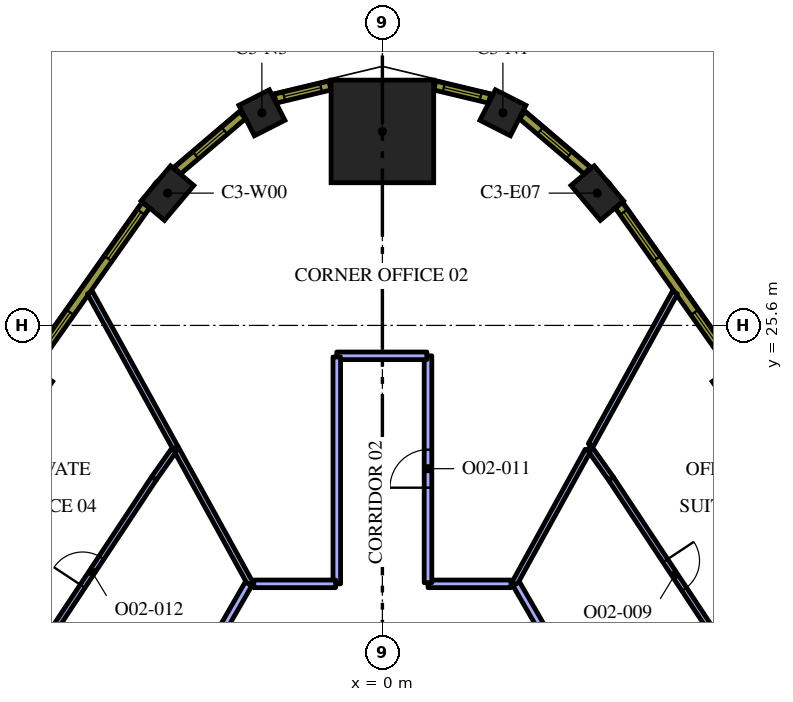
"""IFC4 building model, lengths in metres.
Left out: names, types, materials, properties, quantities, classifications, styles, units other than length and angle.
Written with IfcOpenShell. Run it as: python <this file> out.ifc"""

import sys

from ifc_helpers import new_model, si_unit, direction, frame, frame_2d, origin, origin_2d, place, context, subcontext, project, spatial, rectangle, extrude, element, fill, save


model = new_model("IFC4")
c1 = context("Model", 3, precision=1e-05, world=origin(), true_north=direction((0.0, 1.0)))
c2 = subcontext(c1, "Body", "Model", "MODEL_VIEW")
j1 = project(units=[si_unit("LENGTHUNIT", "METRE"), si_unit("PLANEANGLEUNIT", "RADIAN")], contexts=[c1])
p1 = place(None, origin())
s1 = spatial("IfcSite", under=j1, at=p1, CompositionType="ELEMENT")
p2 = place(p1, origin())
s2 = spatial("IfcBuilding", under=s1, at=p2, CompositionType="ELEMENT")
p3 = place(p2, frame((0.0, 0.0, 158.4)))
s3 = spatial("IfcBuildingStorey", under=s2, at=p3, CompositionType="ELEMENT", Elevation=158.4)
p4 = place(p3, frame((0.0, 30.704, 0.0), z_axis=(0.0, 0.0, 1.0), x_axis=(0.0, 1.0, 0.0)))
e1 = element("IfcColumn", 1, at=p4, inside=s3, PredefinedType="COLUMN", context=c2, shape_type="SweptSolid", body=[
    extrude(rectangle(XDim=2.7, YDim=2.7, at=origin_2d()), origin(), (0.0, 0.0, 1.0), 4.2),
])
for number, where, z_axis, x_axis in (
    (2, (9.348, 23.854, 0.0), (0.0, 0.0, 1.0), (-0.565, 0.825, 0.0)),
    (3, (5.654, 29.081, 0.0), (0.0, 0.0, 1.0), (-0.644, 0.765, 0.0)),
):
    element("IfcColumn", number, at=place(p3, frame(where, z_axis=z_axis, x_axis=x_axis)), inside=s3, PredefinedType="COLUMN", context=c2, shape_type="SweptSolid", body=[
        extrude(rectangle(XDim=1.2, YDim=0.8, at=origin_2d()), origin(), (0.0, 0.0, 1.0), 4.2),
    ])
for number, where, z_axis, x_axis in (
    (4, (3.171, 31.195, 0.0), (0.0, 0.0, 1.0), (-0.891, 0.453, 0.0)),
    (5, (-3.171, 31.195, 0.0), (0.0, 0.0, 1.0), (-0.891, -0.453, 0.0)),
):
    element("IfcColumn", number, at=place(p3, frame(where, z_axis=z_axis, x_axis=x_axis)), inside=s3, PredefinedType="COLUMN", context=c2, shape_type="SweptSolid", body=[
        extrude(rectangle(XDim=0.9, YDim=0.9, at=origin_2d()), origin(), (0.0, 0.0, 1.0), 4.2),
    ])
for number, where, z_axis, x_axis in (
    (6, (-5.654, 29.081, 0.0), (0.0, 0.0, 1.0), (-0.644, -0.765, 0.0)),
    (7, (-9.348, 23.854, 0.0), (0.0, 0.0, 1.0), (-0.565, -0.825, 0.0)),
):
    element("IfcColumn", number, at=place(p3, frame(where, z_axis=z_axis, x_axis=x_axis)), inside=s3, PredefinedType="COLUMN", context=c2, shape_type="SweptSolid", body=[
        extrude(rectangle(XDim=1.2, YDim=0.8, at=origin_2d()), origin(), (0.0, 0.0, 1.0), 4.2),
    ])
p5 = place(p3, frame((6.013, 21.573, 0.0), z_axis=(0.0, 0.0, 1.0), x_axis=(0.551906048292, -0.833906298009, 0.0)))
e8 = element("IfcWall", 8, at=p5, inside=s3, PredefinedType="PARTITIONING", context=c2, shape_type="SweptSolid", body=[
    extrude(rectangle(XDim=5.995, YDim=0.15, at=frame_2d((2.998, 0.0))), origin(), (0.0, 0.0, 1.0), 3.15),
])
p6 = place(p5, frame((2.595, 0.0, 0.0)))
e9 = element("IfcOpeningElement", 9, at=p6, cuts=e8, PredefinedType="OPENING", context=c2, shape_type="SweptSolid", body=[
    extrude(rectangle(XDim=0.9, YDim=2.1, at=frame_2d((0.45, 1.05))), frame((0.0, 0.085, 0.0), z_axis=(0.0, -1.0, 0.0), x_axis=(1.0, 0.0, 0.0)), (0.0, 0.0, 1.0), 0.17),
])
p7 = place(p3, frame((6.013, 21.573, 0.0), z_axis=(0.0, 0.0, 1.0), x_axis=(-0.576965221715, 0.816768714467, 0.0)))
e10 = element("IfcWall", 10, at=p7, inside=s3, PredefinedType="PARTITIONING", context=c2, shape_type="SweptSolid", body=[
    extrude(rectangle(XDim=0.986, YDim=0.15, at=frame_2d((0.493, 0.0))), origin(), (0.0, 0.0, 1.0), 3.15),
])
p8 = place(p3, frame((5.484, 22.451, 0.0), z_axis=(0.0, 0.0, 1.0), x_axis=(0.483018213307, 0.875610304652, 0.0)))
e11 = element("IfcWall", 11, at=p8, inside=s3, PredefinedType="PARTITIONING", context=c2, shape_type="SweptSolid", body=[
    extrude(rectangle(XDim=4.584, YDim=0.15, at=frame_2d((2.292, 0.0))), origin(), (0.0, 0.0, 1.0), 3.15),
])
p9 = place(p3, frame((3.47, 18.8, 0.0), z_axis=(0.0, 0.0, 1.0), x_axis=(0.483004783308, 0.87561771299, 0.0)))
e12 = element("IfcWall", 12, at=p9, inside=s3, PredefinedType="PARTITIONING", context=c2, shape_type="SweptSolid", body=[
    extrude(rectangle(XDim=4.003, YDim=0.15, at=frame_2d((2.001, 0.0))), origin(), (0.0, 0.0, 1.0), 3.15),
])
p10 = place(p3, frame((8.515, 10.152, 0.0), z_axis=(0.0, 0.0, 1.0), x_axis=(-0.499998974385, 0.866025995923, 0.0)))
e13 = element("IfcWall", 13, at=p10, inside=s3, PredefinedType="PARTITIONING", context=c2, shape_type="SweptSolid", body=[
    extrude(rectangle(XDim=9.986, YDim=0.2, at=frame_2d((4.993, 0.0))), origin(), (0.0, 0.0, 1.0), 3.15),
])
p11 = place(p10, frame((4.5, 0.0, 0.0)))
e14 = element("IfcOpeningElement", 14, at=p11, cuts=e13, PredefinedType="OPENING", context=c2, shape_type="SweptSolid", body=[
    extrude(rectangle(XDim=1.0, YDim=2.1, at=frame_2d((0.5, 1.05))), frame((0.0, 0.11, 0.0), z_axis=(0.0, -1.0, 0.0), x_axis=(1.0, 0.0, 0.0)), (0.0, 0.0, 1.0), 0.22),
])
p12 = place(p3, frame((-5.442, 22.374, 0.0), z_axis=(0.0, 0.0, 1.0), x_axis=(-0.482987550425, 0.875627218703, 0.0)))
e15 = element("IfcWall", 15, at=p12, inside=s3, PredefinedType="PARTITIONING", context=c2, shape_type="SweptSolid", body=[
    extrude(rectangle(XDim=4.672, YDim=0.15, at=frame_2d((2.336, 0.0))), origin(), (0.0, 0.0, 1.0), 3.15),
])
p13 = place(p3, frame((-3.47, 18.8, 0.0), z_axis=(0.0, 0.0, 1.0), x_axis=(-0.482974768035, 0.875634269225, 0.0)))
e16 = element("IfcWall", 16, at=p13, inside=s3, PredefinedType="PARTITIONING", context=c2, shape_type="SweptSolid", body=[
    extrude(rectangle(XDim=4.09, YDim=0.15, at=frame_2d((2.045, 0.0))), origin(), (0.0, 0.0, 1.0), 3.15),
])
p14 = place(p3, frame((3.385, 18.8, 0.0), z_axis=(0.0, 0.0, 1.0), x_axis=(-1.0, 0.0, 0.0)))
e17 = element("IfcWall", 17, at=p14, inside=s3, PredefinedType="PARTITIONING", context=c2, shape_type="SweptSolid", body=[
    extrude(rectangle(XDim=2.185, YDim=0.2, at=frame_2d((1.092, 0.0))), origin(), (0.0, 0.0, 1.0), 3.15),
])
p15 = place(p3, frame((1.2, 18.83, 0.0), z_axis=(0.0, 0.0, 1.0), x_axis=(0.0, 1.0, 0.0)))
e18 = element("IfcWall", 18, at=p15, inside=s3, PredefinedType="PARTITIONING", context=c2, shape_type="SweptSolid", body=[
    extrude(rectangle(XDim=5.97, YDim=0.2, at=frame_2d((2.985, 0.0))), origin(), (0.0, 0.0, 1.0), 3.15),
])
p16 = place(p15, frame((2.5, 0.0, 0.0)))
e19 = element("IfcOpeningElement", 19, at=p16, cuts=e18, PredefinedType="OPENING", context=c2, shape_type="SweptSolid", body=[
    extrude(rectangle(XDim=1.0, YDim=2.1, at=frame_2d((0.5, 1.05))), frame((0.0, 0.11, 0.0), z_axis=(0.0, -1.0, 0.0), x_axis=(1.0, 0.0, 0.0)), (0.0, 0.0, 1.0), 0.22),
])
p17 = place(p3, frame((1.17, 24.8, 0.0), z_axis=(0.0, 0.0, 1.0), x_axis=(-1.0, 0.0, 0.0)))
e20 = element("IfcWall", 20, at=p17, inside=s3, PredefinedType="PARTITIONING", context=c2, shape_type="SweptSolid", body=[
    extrude(rectangle(XDim=2.37, YDim=0.2, at=frame_2d((1.185, 0.0))), origin(), (0.0, 0.0, 1.0), 3.15),
])
p18 = place(p3, frame((-1.2, 24.77, 0.0), z_axis=(0.0, 0.0, 1.0), x_axis=(0.0, -1.0, 0.0)))
e21 = element("IfcWall", 21, at=p18, inside=s3, PredefinedType="PARTITIONING", context=c2, shape_type="SweptSolid", body=[
    extrude(rectangle(XDim=5.97, YDim=0.2, at=frame_2d((2.985, 0.0))), origin(), (0.0, 0.0, 1.0), 3.15),
])
p19 = place(p3, frame((-1.23, 18.8, 0.0), z_axis=(0.0, 0.0, 1.0), x_axis=(-1.0, 0.0, 0.0)))
e22 = element("IfcWall", 22, at=p19, inside=s3, PredefinedType="PARTITIONING", context=c2, shape_type="SweptSolid", body=[
    extrude(rectangle(XDim=2.155, YDim=0.2, at=frame_2d((1.077, 0.0))), origin(), (0.0, 0.0, 1.0), 3.15),
])
p20 = place(p3, frame((-5.492, 22.31, 0.0), z_axis=(0.0, 0.0, 1.0), x_axis=(-0.576980663571, -0.816757806124, 0.0)))
e23 = element("IfcWall", 23, at=p20, inside=s3, PredefinedType="PARTITIONING", context=c2, shape_type="SweptSolid", body=[
    extrude(rectangle(XDim=0.902, YDim=0.15, at=frame_2d((0.451, 0.0))), origin(), (0.0, 0.0, 1.0), 3.15),
])
p21 = place(p3, frame((-9.322, 16.573, 0.0), z_axis=(0.0, 0.0, 1.0), x_axis=(0.551906048292, 0.833906298009, 0.0)))
e24 = element("IfcWall", 24, at=p21, inside=s3, PredefinedType="PARTITIONING", context=c2, shape_type="SweptSolid", body=[
    extrude(rectangle(XDim=5.995, YDim=0.15, at=frame_2d((2.998, 0.0))), origin(), (0.0, 0.0, 1.0), 3.15),
])
p22 = place(p21, frame((2.595, 0.0, 0.0)))
e25 = element("IfcOpeningElement", 25, at=p22, cuts=e24, PredefinedType="OPENING", context=c2, shape_type="SweptSolid", body=[
    extrude(rectangle(XDim=0.9, YDim=2.1, at=frame_2d((0.45, 1.05))), frame((0.0, 0.085, 0.0), z_axis=(0.0, -1.0, 0.0), x_axis=(1.0, 0.0, 0.0)), (0.0, 0.0, 1.0), 0.17),
])
p23 = place(p3, frame((-3.522, 18.8, 0.0), z_axis=(0.0, 0.0, 1.0), x_axis=(-0.500015783377, -0.866016291056, 0.0)))
e26 = element("IfcWall", 26, at=p23, inside=s3, PredefinedType="PARTITIONING", context=c2, shape_type="SweptSolid", body=[
    extrude(rectangle(XDim=9.99, YDim=0.2, at=frame_2d((4.995, 0.0))), origin(), (0.0, 0.0, 1.0), 3.15),
])
p24 = place(p23, frame((4.5, 0.0, 0.0)))
e27 = element("IfcOpeningElement", 27, at=p24, cuts=e26, PredefinedType="OPENING", context=c2, shape_type="SweptSolid", body=[
    extrude(rectangle(XDim=1.0, YDim=2.1, at=frame_2d((0.5, 1.05))), frame((0.0, 0.11, 0.0), z_axis=(0.0, -1.0, 0.0), x_axis=(1.0, 0.0, 0.0)), (0.0, 0.0, 1.0), 0.22),
])
p25 = place(p3, frame((9.231, 24.504, 0.0), z_axis=(0.0, 0.0, 1.0), x_axis=(-0.577115207679, 0.816662743772, 0.0)))
e28 = element("IfcWall", 28, at=p25, inside=s3, PredefinedType="SOLIDWALL", context=c2, shape_type="SweptSolid", body=[
    extrude(rectangle(XDim=5.213, YDim=0.24, at=frame_2d((2.606, 0.0))), origin(), (0.0, 0.0, 1.0), 3.95),
])
p26 = place(p25, frame((0.261, 0.0, 0.9)))
e29 = element("IfcOpeningElement", 29, at=p26, cuts=e28, PredefinedType="OPENING", context=c2, shape_type="SweptSolid", body=[
    extrude(rectangle(XDim=1.5, YDim=2.55, at=frame_2d((0.75, 1.275))), frame((0.0, 0.13, 0.0), z_axis=(0.0, -1.0, 0.0), x_axis=(1.0, 0.0, 0.0)), (0.0, 0.0, 1.0), 0.26),
])
p27 = place(p25, frame((3.492, 0.0, 0.9)))
e30 = element("IfcOpeningElement", 30, at=p27, cuts=e28, PredefinedType="OPENING", context=c2, shape_type="SweptSolid", body=[
    extrude(rectangle(XDim=1.5, YDim=2.55, at=frame_2d((0.75, 1.275))), frame((0.0, 0.13, 0.0), z_axis=(0.0, -1.0, 0.0), x_axis=(1.0, 0.0, 0.0)), (0.0, 0.0, 1.0), 0.26),
])
p28 = place(p3, frame((5.392, 29.672, 0.0), z_axis=(0.0, 0.0, 1.0), x_axis=(-0.761419744247, 0.648259186645, 0.0)))
e31 = element("IfcWall", 31, at=p28, inside=s3, PredefinedType="SOLIDWALL", context=c2, shape_type="SweptSolid", body=[
    extrude(rectangle(XDim=2.25, YDim=0.24, at=frame_2d((1.125, 0.0))), origin(), (0.0, 0.0, 1.0), 3.95),
])
p29 = place(p28, frame((0.625, 0.0, 0.9)))
e32 = element("IfcOpeningElement", 32, at=p29, cuts=e31, PredefinedType="OPENING", context=c2, shape_type="SweptSolid", body=[
    extrude(rectangle(XDim=1.0, YDim=2.55, at=frame_2d((0.5, 1.275))), frame((0.0, 0.13, 0.0), z_axis=(0.0, -1.0, 0.0), x_axis=(1.0, 0.0, 0.0)), (0.0, 0.0, 1.0), 0.26),
])
p30 = place(p3, frame((2.821, 31.566, 0.0), z_axis=(0.0, 0.0, 1.0), x_axis=(-0.972479955788, 0.232986556673, 0.0)))
e33 = element("IfcWall", 33, at=p30, inside=s3, PredefinedType="SOLIDWALL", context=c2, shape_type="SweptSolid", body=[
    extrude(rectangle(XDim=1.482, YDim=0.24, at=frame_2d((0.741, 0.0))), origin(), (0.0, 0.0, 1.0), 3.95),
])
p31 = place(p30, frame((0.241, 0.0, 0.9)))
e34 = element("IfcOpeningElement", 34, at=p31, cuts=e33, PredefinedType="OPENING", context=c2, shape_type="SweptSolid", body=[
    extrude(rectangle(XDim=1.0, YDim=2.55, at=frame_2d((0.5, 1.275))), frame((0.0, 0.13, 0.0), z_axis=(0.0, -1.0, 0.0), x_axis=(1.0, 0.0, 0.0)), (0.0, 0.0, 1.0), 0.26),
])
p32 = place(p3, frame((-1.38, 31.912, 0.0), z_axis=(0.0, 0.0, 1.0), x_axis=(-0.972479955788, -0.232986556673, 0.0)))
e35 = element("IfcWall", 35, at=p32, inside=s3, PredefinedType="SOLIDWALL", context=c2, shape_type="SweptSolid", body=[
    extrude(rectangle(XDim=1.482, YDim=0.24, at=frame_2d((0.741, 0.0))), origin(), (0.0, 0.0, 1.0), 3.95),
])
p33 = place(p32, frame((0.241, 0.0, 0.9)))
e36 = element("IfcOpeningElement", 36, at=p33, cuts=e35, PredefinedType="OPENING", context=c2, shape_type="SweptSolid", body=[
    extrude(rectangle(XDim=1.0, YDim=2.55, at=frame_2d((0.5, 1.275))), frame((0.0, 0.13, 0.0), z_axis=(0.0, -1.0, 0.0), x_axis=(1.0, 0.0, 0.0)), (0.0, 0.0, 1.0), 0.26),
])
p34 = place(p3, frame((-3.678, 31.131, 0.0), z_axis=(0.0, 0.0, 1.0), x_axis=(-0.761419744247, -0.648259186645, 0.0)))
e37 = element("IfcWall", 37, at=p34, inside=s3, PredefinedType="SOLIDWALL", context=c2, shape_type="SweptSolid", body=[
    extrude(rectangle(XDim=2.25, YDim=0.24, at=frame_2d((1.125, 0.0))), origin(), (0.0, 0.0, 1.0), 3.95),
])
p35 = place(p34, frame((0.625, 0.0, 0.9)))
e38 = element("IfcOpeningElement", 38, at=p35, cuts=e37, PredefinedType="OPENING", context=c2, shape_type="SweptSolid", body=[
    extrude(rectangle(XDim=1.0, YDim=2.55, at=frame_2d((0.5, 1.275))), frame((0.0, 0.13, 0.0), z_axis=(0.0, -1.0, 0.0), x_axis=(1.0, 0.0, 0.0)), (0.0, 0.0, 1.0), 0.26),
])
p36 = place(p3, frame((-6.223, 28.762, 0.0), z_axis=(0.0, 0.0, 1.0), x_axis=(-0.577115207679, -0.816662743772, 0.0)))
e39 = element("IfcWall", 39, at=p36, inside=s3, PredefinedType="SOLIDWALL", context=c2, shape_type="SweptSolid", body=[
    extrude(rectangle(XDim=5.213, YDim=0.24, at=frame_2d((2.606, 0.0))), origin(), (0.0, 0.0, 1.0), 3.95),
])
p37 = place(p36, frame((0.221, 0.0, 0.9)))
e40 = element("IfcOpeningElement", 40, at=p37, cuts=e39, PredefinedType="OPENING", context=c2, shape_type="SweptSolid", body=[
    extrude(rectangle(XDim=1.5, YDim=2.55, at=frame_2d((0.75, 1.275))), frame((0.0, 0.13, 0.0), z_axis=(0.0, -1.0, 0.0), x_axis=(1.0, 0.0, 0.0)), (0.0, 0.0, 1.0), 0.26),
])
p38 = place(p36, frame((3.452, 0.0, 0.9)))
e41 = element("IfcOpeningElement", 41, at=p38, cuts=e39, PredefinedType="OPENING", context=c2, shape_type="SweptSolid", body=[
    extrude(rectangle(XDim=1.5, YDim=2.55, at=frame_2d((0.75, 1.275))), frame((0.0, 0.13, 0.0), z_axis=(0.0, -1.0, 0.0), x_axis=(1.0, 0.0, 0.0)), (0.0, 0.0, 1.0), 0.26),
])
p39 = place(p6, origin())
e42 = element("IfcDoor", 42, at=p39, inside=s3, OperationType="SINGLE_SWING_RIGHT", PredefinedType="DOOR", context=c2, shape_type="SweptSolid", body=[
    extrude(rectangle(XDim=0.9, YDim=2.1, at=frame_2d((0.45, 1.05))), frame((0.0, 0.025, 0.0), z_axis=(0.0, -1.0, 0.0), x_axis=(1.0, 0.0, 0.0)), (0.0, 0.0, 1.0), 0.05),
])
fill(e9, e42)
p40 = place(p16, origin())
e43 = element("IfcDoor", 43, at=p40, inside=s3, OperationType="SINGLE_SWING_RIGHT", PredefinedType="DOOR", context=c2, shape_type="SweptSolid", body=[
    extrude(rectangle(XDim=1.0, YDim=2.1, at=frame_2d((0.5, 1.05))), frame((0.0, 0.025, 0.0), z_axis=(0.0, -1.0, 0.0), x_axis=(1.0, 0.0, 0.0)), (0.0, 0.0, 1.0), 0.05),
])
fill(e19, e43)
p41 = place(p22, origin())
e44 = element("IfcDoor", 44, at=p41, inside=s3, OperationType="SINGLE_SWING_RIGHT", PredefinedType="DOOR", context=c2, shape_type="SweptSolid", body=[
    extrude(rectangle(XDim=0.9, YDim=2.1, at=frame_2d((0.45, 1.05))), frame((0.0, 0.025, 0.0), z_axis=(0.0, -1.0, 0.0), x_axis=(1.0, 0.0, 0.0)), (0.0, 0.0, 1.0), 0.05),
])
fill(e25, e44)
p42 = place(p26, origin())
e45 = element("IfcWindow", 45, at=p42, inside=s3, PartitioningType="SINGLE_PANEL", PredefinedType="WINDOW", context=c2, shape_type="SweptSolid", body=[
    extrude(rectangle(XDim=1.5, YDim=2.55, at=frame_2d((0.75, 1.275))), frame((0.0, 0.04, 0.0), z_axis=(0.0, -1.0, 0.0), x_axis=(1.0, 0.0, 0.0)), (0.0, 0.0, 1.0), 0.06),
])
fill(e29, e45)
p43 = place(p27, origin())
e46 = element("IfcWindow", 46, at=p43, inside=s3, PartitioningType="SINGLE_PANEL", PredefinedType="WINDOW", context=c2, shape_type="SweptSolid", body=[
    extrude(rectangle(XDim=1.5, YDim=2.55, at=frame_2d((0.75, 1.275))), frame((0.0, 0.04, 0.0), z_axis=(0.0, -1.0, 0.0), x_axis=(1.0, 0.0, 0.0)), (0.0, 0.0, 1.0), 0.06),
])
fill(e30, e46)
p44 = place(p29, origin())
e47 = element("IfcWindow", 47, at=p44, inside=s3, PartitioningType="SINGLE_PANEL", PredefinedType="WINDOW", context=c2, shape_type="SweptSolid", body=[
    extrude(rectangle(XDim=1.0, YDim=2.55, at=frame_2d((0.5, 1.275))), frame((0.0, 0.04, 0.0), z_axis=(0.0, -1.0, 0.0), x_axis=(1.0, 0.0, 0.0)), (0.0, 0.0, 1.0), 0.06),
])
fill(e32, e47)
p45 = place(p31, origin())
e48 = element("IfcWindow", 48, at=p45, inside=s3, PartitioningType="SINGLE_PANEL", PredefinedType="WINDOW", context=c2, shape_type="SweptSolid", body=[
    extrude(rectangle(XDim=1.0, YDim=2.55, at=frame_2d((0.5, 1.275))), frame((0.0, 0.04, 0.0), z_axis=(0.0, -1.0, 0.0), x_axis=(1.0, 0.0, 0.0)), (0.0, 0.0, 1.0), 0.06),
])
fill(e34, e48)
p46 = place(p33, origin())
e49 = element("IfcWindow", 49, at=p46, inside=s3, PartitioningType="SINGLE_PANEL", PredefinedType="WINDOW", context=c2, shape_type="SweptSolid", body=[
    extrude(rectangle(XDim=1.0, YDim=2.55, at=frame_2d((0.5, 1.275))), frame((0.0, 0.04, 0.0), z_axis=(0.0, -1.0, 0.0), x_axis=(1.0, 0.0, 0.0)), (0.0, 0.0, 1.0), 0.06),
])
fill(e36, e49)
p47 = place(p35, origin())
e50 = element("IfcWindow", 50, at=p47, inside=s3, PartitioningType="SINGLE_PANEL", PredefinedType="WINDOW", context=c2, shape_type="SweptSolid", body=[
    extrude(rectangle(XDim=1.0, YDim=2.55, at=frame_2d((0.5, 1.275))), frame((0.0, 0.04, 0.0), z_axis=(0.0, -1.0, 0.0), x_axis=(1.0, 0.0, 0.0)), (0.0, 0.0, 1.0), 0.06),
])
fill(e38, e50)
p48 = place(p37, origin())
e51 = element("IfcWindow", 51, at=p48, inside=s3, PartitioningType="SINGLE_PANEL", PredefinedType="WINDOW", context=c2, shape_type="SweptSolid", body=[
    extrude(rectangle(XDim=1.5, YDim=2.55, at=frame_2d((0.75, 1.275))), frame((0.0, 0.04, 0.0), z_axis=(0.0, -1.0, 0.0), x_axis=(1.0, 0.0, 0.0)), (0.0, 0.0, 1.0), 0.06),
])
fill(e40, e51)
p49 = place(p38, origin())
e52 = element("IfcWindow", 52, at=p49, inside=s3, PartitioningType="SINGLE_PANEL", PredefinedType="WINDOW", context=c2, shape_type="SweptSolid", body=[
    extrude(rectangle(XDim=1.5, YDim=2.55, at=frame_2d((0.75, 1.275))), frame((0.0, 0.04, 0.0), z_axis=(0.0, -1.0, 0.0), x_axis=(1.0, 0.0, 0.0)), (0.0, 0.0, 1.0), 0.06),
])
fill(e41, e52)
save(model, sys.argv[1])
